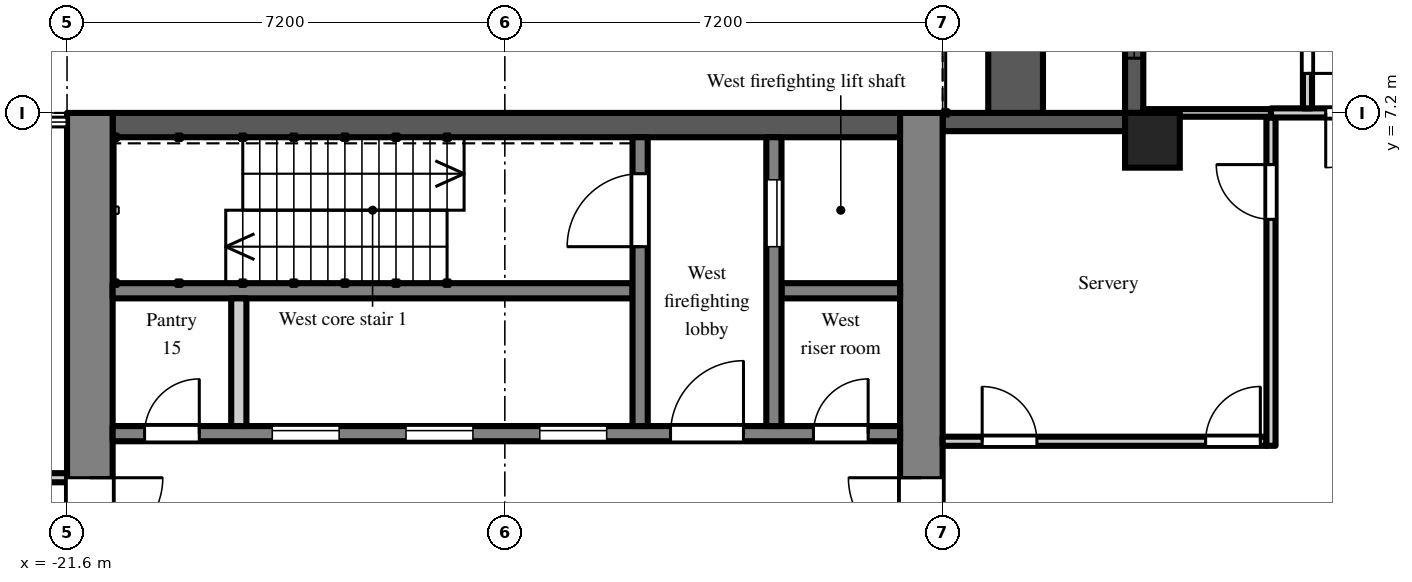
"""IFC4 building model, lengths in metres.
Left out: names, types, materials, properties, quantities, classifications, styles, units other than length and angle.
Written with IfcOpenShell. Run it as: python <this file> out.ifc"""

import sys

from ifc_helpers import new_model, si_unit, direction, frame, frame_2d, origin, origin_2d, place, context, subcontext, project, spatial, rectangle, extrude, element, fill, save


model = new_model("IFC4")
c1 = context("Model", 3, precision=1e-05, world=origin(), true_north=direction((0.0, 1.0)))
c2 = subcontext(c1, "Body", "Model", "MODEL_VIEW")
j1 = project(units=[si_unit("LENGTHUNIT", "METRE"), si_unit("PLANEANGLEUNIT", "RADIAN")], contexts=[c1])
p1 = place(None, origin())
s1 = spatial("IfcSite", under=j1, at=p1, CompositionType="ELEMENT")
p2 = place(p1, origin())
s2 = spatial("IfcBuilding", under=s1, at=p2, CompositionType="ELEMENT")
p3 = place(p2, frame((0.0, 0.0, 166.5)))
s3 = spatial("IfcBuildingStorey", under=s2, at=p3, CompositionType="ELEMENT", Elevation=166.5)
p4 = place(p3, frame((-3.75, 6.75, 0.0), z_axis=(0.0, 0.0, 1.0), x_axis=(1.0, 0.0, 0.0)))
e1 = element("IfcColumn", 1, at=p4, inside=s3, PredefinedType="COLUMN", context=c2, shape_type="SweptSolid", body=[
    extrude(rectangle(XDim=0.9, YDim=0.9, at=origin_2d()), origin(), (0.0, 0.0, 1.0), 4.2),
])
p5 = place(p3, frame((-4.05, 14.4, 0.0), z_axis=(0.0, 0.0, 1.0), x_axis=(0.0, -1.0, 0.0)))
e2 = element("IfcWall", 2, at=p5, inside=s3, PredefinedType="SOLIDWALL", context=c2, shape_type="SweptSolid", body=[
    extrude(rectangle(XDim=7.2, YDim=0.3, at=frame_2d((3.6, 0.0))), origin(), (0.0, 0.0, 1.0), 3.4),
])
p6 = place(p5, frame((3.0, 0.0, 0.0)))
e3 = element("IfcOpeningElement", 3, at=p6, cuts=e2, PredefinedType="OPENING", context=c2, shape_type="SweptSolid", body=[
    extrude(rectangle(XDim=1.2, YDim=2.05, at=frame_2d((0.6, 1.025))), frame((0.0, 0.16, 0.0), z_axis=(0.0, -1.0, 0.0), x_axis=(1.0, 0.0, 0.0)), (0.0, 0.0, 1.0), 0.32),
])
p7 = place(p5, frame((0.9, 0.0, 0.2)))
e4 = element("IfcOpeningElement", 4, at=p7, cuts=e2, PredefinedType="OPENING", context=c2, shape_type="SweptSolid", body=[
    extrude(rectangle(XDim=1.8, YDim=1.85, at=frame_2d((0.9, 0.925))), frame((0.0, 0.16, 0.0), z_axis=(0.0, -1.0, 0.0), x_axis=(1.0, 0.0, 0.0)), (0.0, 0.0, 1.0), 0.32),
])
p8 = place(p5, frame((4.5, 0.0, 0.2)))
e5 = element("IfcOpeningElement", 5, at=p8, cuts=e2, PredefinedType="OPENING", context=c2, shape_type="SweptSolid", body=[
    extrude(rectangle(XDim=1.8, YDim=1.85, at=frame_2d((0.9, 0.925))), frame((0.0, 0.16, 0.0), z_axis=(0.0, -1.0, 0.0), x_axis=(1.0, 0.0, 0.0)), (0.0, 0.0, 1.0), 0.32),
])
p9 = place(p3, frame((-4.2, 7.05, 0.0), z_axis=(0.0, 0.0, 1.0), x_axis=(-1.0, 0.0, 0.0)))
e6 = element("IfcWall", 6, at=p9, inside=s3, PredefinedType="SOLIDWALL", context=c2, shape_type="SweptSolid", body=[
    extrude(rectangle(XDim=3.0, YDim=0.3, at=frame_2d((1.5, 0.0))), origin(), (0.0, 0.0, 1.0), 3.4),
])
p10 = place(p3, frame((-6.0, 7.2, 0.0), z_axis=(0.0, 0.0, 1.0), x_axis=(0.0, 1.0, 0.0)))
e7 = element("IfcWall", 7, at=p10, inside=s3, PredefinedType="PARAPET", context=c2, shape_type="SweptSolid", body=[
    extrude(rectangle(XDim=7.2, YDim=0.9, at=frame_2d((3.6, 0.0))), origin(), (0.0, 0.0, 1.0), 0.8),
])
p11 = place(p3, frame((-7.55, -7.2, 0.0), z_axis=(0.0, 0.0, 1.0), x_axis=(0.0, 1.0, 0.0)))
e8 = element("IfcWall", 8, at=p11, inside=s3, PredefinedType="SHEAR", context=c2, shape_type="SweptSolid", body=[
    extrude(rectangle(XDim=14.4, YDim=0.7, at=frame_2d((7.2, 0.0))), origin(), (0.0, 0.0, 1.0), 3.8),
])
p12 = place(p11, frame((6.0, 0.0, 0.0)))
e9 = element("IfcOpeningElement", 9, at=p12, cuts=e8, PredefinedType="OPENING", context=c2, shape_type="SweptSolid", body=[
    extrude(rectangle(XDim=2.4, YDim=2.2, at=frame_2d((1.2, 1.1))), frame((0.0, 0.36, 0.0), z_axis=(0.0, -1.0, 0.0), x_axis=(1.0, 0.0, 0.0)), (0.0, 0.0, 1.0), 0.72),
])
p13 = place(p3, frame((-21.225, -7.2, 0.0), z_axis=(0.0, 0.0, 1.0), x_axis=(0.0, 1.0, 0.0)))
e10 = element("IfcWall", 10, at=p13, inside=s3, PredefinedType="SHEAR", context=c2, shape_type="SweptSolid", body=[
    extrude(rectangle(XDim=14.4, YDim=0.75, at=frame_2d((7.2, 0.0))), origin(), (0.0, 0.0, 1.0), 3.8),
])
p14 = place(p13, frame((6.0, 0.0, 0.0)))
e11 = element("IfcOpeningElement", 11, at=p14, cuts=e10, PredefinedType="OPENING", context=c2, shape_type="SweptSolid", body=[
    extrude(rectangle(XDim=2.4, YDim=2.2, at=frame_2d((1.2, 1.1))), frame((0.0, 0.385, 0.0), z_axis=(0.0, -1.0, 0.0), x_axis=(1.0, 0.0, 0.0)), (0.0, 0.0, 1.0), 0.77),
])
p15 = place(p3, frame((-7.9, 7.0, 0.0), z_axis=(0.0, 0.0, 1.0), x_axis=(-1.0, 0.0, 0.0)))
e12 = element("IfcWall", 12, at=p15, inside=s3, PredefinedType="SHEAR", context=c2, shape_type="SweptSolid", body=[
    extrude(rectangle(XDim=12.95, YDim=0.4, at=frame_2d((6.475, 0.0))), origin(), (0.0, 0.0, 1.0), 3.8),
])
p16 = place(p3, frame((-7.9, 1.925, 0.0), z_axis=(0.0, 0.0, 1.0), x_axis=(-1.0, 0.0, 0.0)))
e13 = element("IfcWall", 13, at=p16, inside=s3, PredefinedType="SHEAR", context=c2, shape_type="SweptSolid", body=[
    extrude(rectangle(XDim=12.95, YDim=0.25, at=frame_2d((6.475, 0.0))), origin(), (0.0, 0.0, 1.0), 3.8),
])
p17 = place(p16, frame((4.825, 0.0, 0.0)))
e14 = element("IfcOpeningElement", 14, at=p17, cuts=e13, PredefinedType="OPENING", context=c2, shape_type="SweptSolid", body=[
    extrude(rectangle(XDim=1.1, YDim=2.1, at=frame_2d((0.55, 1.05))), frame((0.0, 0.135, 0.0), z_axis=(0.0, -1.0, 0.0), x_axis=(1.0, 0.0, 0.0)), (0.0, 0.0, 1.0), 0.27),
])
p18 = place(p16, frame((7.025, 0.0, 0.0)))
e15 = element("IfcOpeningElement", 15, at=p18, cuts=e13, PredefinedType="OPENING", context=c2, shape_type="SweptSolid", body=[
    extrude(rectangle(XDim=1.1, YDim=2.1, at=frame_2d((0.55, 1.05))), frame((0.0, 0.135, 0.0), z_axis=(0.0, -1.0, 0.0), x_axis=(1.0, 0.0, 0.0)), (0.0, 0.0, 1.0), 0.27),
])
p19 = place(p16, frame((9.225, 0.0, 0.0)))
e16 = element("IfcOpeningElement", 16, at=p19, cuts=e13, PredefinedType="OPENING", context=c2, shape_type="SweptSolid", body=[
    extrude(rectangle(XDim=1.1, YDim=2.1, at=frame_2d((0.55, 1.05))), frame((0.0, 0.135, 0.0), z_axis=(0.0, -1.0, 0.0), x_axis=(1.0, 0.0, 0.0)), (0.0, 0.0, 1.0), 0.27),
])
p20 = place(p16, frame((0.525, 0.0, 0.0)))
e17 = element("IfcOpeningElement", 17, at=p20, cuts=e13, PredefinedType="OPENING", context=c2, shape_type="SweptSolid", body=[
    extrude(rectangle(XDim=0.9, YDim=2.1, at=frame_2d((0.45, 1.05))), frame((0.0, 0.135, 0.0), z_axis=(0.0, -1.0, 0.0), x_axis=(1.0, 0.0, 0.0)), (0.0, 0.0, 1.0), 0.27),
])
p21 = place(p16, frame((2.575, 0.0, 0.0)))
e18 = element("IfcOpeningElement", 18, at=p21, cuts=e13, PredefinedType="OPENING", context=c2, shape_type="SweptSolid", body=[
    extrude(rectangle(XDim=1.2, YDim=2.1, at=frame_2d((0.6, 1.05))), frame((0.0, 0.135, 0.0), z_axis=(0.0, -1.0, 0.0), x_axis=(1.0, 0.0, 0.0)), (0.0, 0.0, 1.0), 0.27),
])
p22 = place(p16, frame((11.525, 0.0, 0.0)))
e19 = element("IfcOpeningElement", 19, at=p22, cuts=e13, PredefinedType="OPENING", context=c2, shape_type="SweptSolid", body=[
    extrude(rectangle(XDim=0.9, YDim=2.1, at=frame_2d((0.45, 1.05))), frame((0.0, 0.135, 0.0), z_axis=(0.0, -1.0, 0.0), x_axis=(1.0, 0.0, 0.0)), (0.0, 0.0, 1.0), 0.27),
])
p23 = place(p3, frame((-7.9, 4.275, 0.0), z_axis=(0.0, 0.0, 1.0), x_axis=(-1.0, 0.0, 0.0)))
e20 = element("IfcWall", 20, at=p23, inside=s3, PredefinedType="SHEAR", context=c2, shape_type="SweptSolid", body=[
    extrude(rectangle(XDim=1.95, YDim=0.25, at=frame_2d((0.975, 0.0))), origin(), (0.0, 0.0, 1.0), 3.8),
])
p24 = place(p3, frame((-12.3, 4.275, 0.0), z_axis=(0.0, 0.0, 1.0), x_axis=(-1.0, 0.0, 0.0)))
e21 = element("IfcWall", 21, at=p24, inside=s3, PredefinedType="SHEAR", context=c2, shape_type="SweptSolid", body=[
    extrude(rectangle(XDim=8.55, YDim=0.25, at=frame_2d((4.275, 0.0))), origin(), (0.0, 0.0, 1.0), 3.8),
])
p25 = place(p3, frame((-9.975, 2.05, 0.0), z_axis=(0.0, 0.0, 1.0), x_axis=(0.0, 1.0, 0.0)))
e22 = element("IfcWall", 22, at=p25, inside=s3, PredefinedType="SHEAR", context=c2, shape_type="SweptSolid", body=[
    extrude(rectangle(XDim=4.75, YDim=0.25, at=frame_2d((2.375, 0.0))), origin(), (0.0, 0.0, 1.0), 3.8),
])
p26 = place(p25, frame((2.95, 0.0, 0.0)))
e23 = element("IfcOpeningElement", 23, at=p26, cuts=e22, PredefinedType="OPENING", context=c2, shape_type="SweptSolid", body=[
    extrude(rectangle(XDim=1.1, YDim=2.1, at=frame_2d((0.55, 1.05))), frame((0.0, 0.135, 0.0), z_axis=(0.0, -1.0, 0.0), x_axis=(1.0, 0.0, 0.0)), (0.0, 0.0, 1.0), 0.27),
])
p27 = place(p3, frame((-12.175, 2.05, 0.0), z_axis=(0.0, 0.0, 1.0), x_axis=(0.0, 1.0, 0.0)))
e24 = element("IfcWall", 24, at=p27, inside=s3, PredefinedType="SHEAR", context=c2, shape_type="SweptSolid", body=[
    extrude(rectangle(XDim=4.75, YDim=0.25, at=frame_2d((2.375, 0.0))), origin(), (0.0, 0.0, 1.0), 3.8),
])
p28 = place(p27, frame((2.95, 0.0, 0.0)))
e25 = element("IfcOpeningElement", 25, at=p28, cuts=e24, PredefinedType="OPENING", context=c2, shape_type="SweptSolid", body=[
    extrude(rectangle(XDim=1.2, YDim=2.1, at=frame_2d((0.6, 1.05))), frame((0.0, 0.135, 0.0), z_axis=(0.0, -1.0, 0.0), x_axis=(1.0, 0.0, 0.0)), (0.0, 0.0, 1.0), 0.27),
])
p29 = place(p3, frame((-18.775, 2.05, 0.0), z_axis=(0.0, 0.0, 1.0), x_axis=(0.0, 1.0, 0.0)))
e26 = element("IfcWall", 26, at=p29, inside=s3, PredefinedType="PARTITIONING", context=c2, shape_type="SweptSolid", body=[
    extrude(rectangle(XDim=2.1, YDim=0.25, at=frame_2d((1.05, 0.0))), origin(), (0.0, 0.0, 1.0), 3.8),
])
p30 = place(p3, frame((-36.5, 1.2, 0.0), z_axis=(0.0, 0.0, 1.0), x_axis=(1.0, 0.0, 0.0)))
e27 = element("IfcWall", 27, at=p30, inside=s3, PredefinedType="PARTITIONING", context=c2, shape_type="SweptSolid", body=[
    extrude(rectangle(XDim=14.9, YDim=0.15, at=frame_2d((7.45, 0.0))), origin(), (0.0, 0.0, 1.0), 3.8),
])
p31 = place(p30, frame((3.55, 0.0, 0.0)))
e28 = element("IfcOpeningElement", 28, at=p31, cuts=e27, PredefinedType="OPENING", context=c2, shape_type="SweptSolid", body=[
    extrude(rectangle(XDim=1.8, YDim=2.1, at=frame_2d((0.9, 1.05))), frame((0.0, 0.085, 0.0), z_axis=(0.0, -1.0, 0.0), x_axis=(1.0, 0.0, 0.0)), (0.0, 0.0, 1.0), 0.17),
])
p32 = place(p30, frame((8.4, 0.0, 0.0)))
e29 = element("IfcOpeningElement", 29, at=p32, cuts=e27, PredefinedType="OPENING", context=c2, shape_type="SweptSolid", body=[
    extrude(rectangle(XDim=1.0, YDim=2.1, at=frame_2d((0.5, 1.05))), frame((0.0, 0.085, 0.0), z_axis=(0.0, -1.0, 0.0), x_axis=(1.0, 0.0, 0.0)), (0.0, 0.0, 1.0), 0.17),
])
p33 = place(p30, frame((12.25, 0.0, 0.0)))
e30 = element("IfcOpeningElement", 30, at=p33, cuts=e27, PredefinedType="OPENING", context=c2, shape_type="SweptSolid", body=[
    extrude(rectangle(XDim=1.8, YDim=2.1, at=frame_2d((0.9, 1.05))), frame((0.0, 0.085, 0.0), z_axis=(0.0, -1.0, 0.0), x_axis=(1.0, 0.0, 0.0)), (0.0, 0.0, 1.0), 0.17),
])
p34 = place(p30, frame((0.55, 0.0, 0.0)))
e31 = element("IfcOpeningElement", 31, at=p34, cuts=e27, PredefinedType="OPENING", context=c2, shape_type="SweptSolid", body=[
    extrude(rectangle(XDim=1.8, YDim=2.1, at=frame_2d((0.9, 1.05))), frame((0.0, 0.085, 0.0), z_axis=(0.0, -1.0, 0.0), x_axis=(1.0, 0.0, 0.0)), (0.0, 0.0, 1.0), 0.17),
])
p35 = place(p3, frame((-7.2, 1.8, 0.0), z_axis=(0.0, 0.0, 1.0), x_axis=(1.0, 0.0, 0.0)))
e32 = element("IfcWall", 32, at=p35, inside=s3, PredefinedType="PARTITIONING", context=c2, shape_type="SweptSolid", body=[
    extrude(rectangle(XDim=5.325, YDim=0.15, at=frame_2d((2.663, 0.0))), origin(), (0.0, 0.0, 1.0), 3.8),
])
p36 = place(p35, frame((0.65, 0.0, 0.0)))
e33 = element("IfcOpeningElement", 33, at=p36, cuts=e32, PredefinedType="OPENING", context=c2, shape_type="SweptSolid", body=[
    extrude(rectangle(XDim=0.9, YDim=2.1, at=frame_2d((0.45, 1.05))), frame((0.0, 0.085, 0.0), z_axis=(0.0, -1.0, 0.0), x_axis=(1.0, 0.0, 0.0)), (0.0, 0.0, 1.0), 0.17),
])
p37 = place(p35, frame((4.325, 0.0, 0.0)))
e34 = element("IfcOpeningElement", 34, at=p37, cuts=e32, PredefinedType="OPENING", context=c2, shape_type="SweptSolid", body=[
    extrude(rectangle(XDim=0.9, YDim=2.1, at=frame_2d((0.45, 1.05))), frame((0.0, 0.085, 0.0), z_axis=(0.0, -1.0, 0.0), x_axis=(1.0, 0.0, 0.0)), (0.0, 0.0, 1.0), 0.17),
])
p38 = place(p3, frame((-3.9, 7.2, 0.0), z_axis=(0.0, 0.0, 1.0), x_axis=(1.0, 0.0, 0.0)))
e35 = element("IfcWall", 35, at=p38, inside=s3, PredefinedType="PARTITIONING", context=c2, shape_type="SweptSolid", body=[
    extrude(rectangle(XDim=2.1, YDim=0.125, at=frame_2d((1.05, 0.0))), origin(), (0.0, 0.0, 1.0), 3.8),
])
p39 = place(p3, frame((-1.8, 1.725, 0.0), z_axis=(0.0, 0.0, 1.0), x_axis=(0.0, 1.0, 0.0)))
e36 = element("IfcWall", 36, at=p39, inside=s3, PredefinedType="PARTITIONING", context=c2, shape_type="SweptSolid", body=[
    extrude(rectangle(XDim=5.4, YDim=0.15, at=frame_2d((2.7, 0.0))), origin(), (0.0, 0.0, 1.0), 3.8),
])
p40 = place(p39, frame((3.725, 0.0, 0.0)))
e37 = element("IfcOpeningElement", 37, at=p40, cuts=e36, PredefinedType="OPENING", context=c2, shape_type="SweptSolid", body=[
    extrude(rectangle(XDim=0.9, YDim=2.1, at=frame_2d((0.45, 1.05))), frame((0.0, 0.085, 0.0), z_axis=(0.0, -1.0, 0.0), x_axis=(1.0, 0.0, 0.0)), (0.0, 0.0, 1.0), 0.17),
])
p41 = place(p3, frame((-1.8, 7.2, 0.0), z_axis=(0.0, 0.0, 1.0), x_axis=(1.0, 0.0, 0.0)))
e38 = element("IfcWall", 38, at=p41, inside=s3, PredefinedType="PARTITIONING", context=c2, shape_type="SweptSolid", body=[
    extrude(rectangle(XDim=3.6, YDim=0.15, at=frame_2d((1.8, 0.0))), origin(), (0.0, 0.0, 1.0), 3.8),
])
p42 = place(p41, frame((0.9, 0.0, 0.0)))
e39 = element("IfcOpeningElement", 39, at=p42, cuts=e38, PredefinedType="OPENING", context=c2, shape_type="SweptSolid", body=[
    extrude(rectangle(XDim=1.8, YDim=2.1, at=frame_2d((0.9, 1.05))), frame((0.0, 0.085, 0.0), z_axis=(0.0, -1.0, 0.0), x_axis=(1.0, 0.0, 0.0)), (0.0, 0.0, 1.0), 0.17),
])
p43 = place(p3, frame((-1.2, 7.275, 0.0), z_axis=(0.0, 0.0, 1.0), x_axis=(0.0, 1.0, 0.0)))
e40 = element("IfcWall", 40, at=p43, inside=s3, PredefinedType="PARTITIONING", context=c2, shape_type="SweptSolid", body=[
    extrude(rectangle(XDim=14.145, YDim=0.15, at=frame_2d((7.073, 0.0))), origin(), (0.0, 0.0, 1.0), 3.8),
])
p44 = place(p43, frame((0.575, 0.0, 0.0)))
e41 = element("IfcOpeningElement", 41, at=p44, cuts=e40, PredefinedType="OPENING", context=c2, shape_type="SweptSolid", body=[
    extrude(rectangle(XDim=1.8, YDim=2.1, at=frame_2d((0.9, 1.05))), frame((0.0, 0.085, 0.0), z_axis=(0.0, -1.0, 0.0), x_axis=(1.0, 0.0, 0.0)), (0.0, 0.0, 1.0), 0.17),
])
p45 = place(p43, frame((4.225, 0.0, 0.0)))
e42 = element("IfcOpeningElement", 42, at=p45, cuts=e40, PredefinedType="OPENING", context=c2, shape_type="SweptSolid", body=[
    extrude(rectangle(XDim=1.0, YDim=2.1, at=frame_2d((0.5, 1.05))), frame((0.0, 0.085, 0.0), z_axis=(0.0, -1.0, 0.0), x_axis=(1.0, 0.0, 0.0)), (0.0, 0.0, 1.0), 0.17),
])
p46 = place(p43, frame((6.875, 0.0, 0.0)))
e43 = element("IfcOpeningElement", 43, at=p46, cuts=e40, PredefinedType="OPENING", context=c2, shape_type="SweptSolid", body=[
    extrude(rectangle(XDim=1.8, YDim=2.1, at=frame_2d((0.9, 1.05))), frame((0.0, 0.085, 0.0), z_axis=(0.0, -1.0, 0.0), x_axis=(1.0, 0.0, 0.0)), (0.0, 0.0, 1.0), 0.17),
])
p47 = place(p43, frame((11.275, 0.0, 0.0)))
e44 = element("IfcOpeningElement", 44, at=p47, cuts=e40, PredefinedType="OPENING", context=c2, shape_type="SweptSolid", body=[
    extrude(rectangle(XDim=1.0, YDim=2.1, at=frame_2d((0.5, 1.05))), frame((0.0, 0.085, 0.0), z_axis=(0.0, -1.0, 0.0), x_axis=(1.0, 0.0, 0.0)), (0.0, 0.0, 1.0), 0.17),
])
p48 = place(p8, origin())
e45 = element("IfcWindow", 45, at=p48, inside=s3, PartitioningType="SINGLE_PANEL", PredefinedType="WINDOW", context=c2, shape_type="SweptSolid", body=[
    extrude(rectangle(XDim=1.8, YDim=1.85, at=frame_2d((0.9, 0.925))), frame((0.0, 0.03, 0.0), z_axis=(0.0, -1.0, 0.0), x_axis=(1.0, 0.0, 0.0)), (0.0, 0.0, 1.0), 0.06),
])
fill(e5, e45)
p49 = place(p17, origin())
e46 = element("IfcDoor", 46, at=p49, inside=s3, OperationType="SLIDING_TO_LEFT", PredefinedType="DOOR", context=c2, shape_type="SweptSolid", body=[
    extrude(rectangle(XDim=1.1, YDim=2.1, at=frame_2d((0.55, 1.05))), frame((0.0, 0.025, 0.0), z_axis=(0.0, -1.0, 0.0), x_axis=(1.0, 0.0, 0.0)), (0.0, 0.0, 1.0), 0.05),
])
fill(e14, e46)
p50 = place(p18, origin())
e47 = element("IfcDoor", 47, at=p50, inside=s3, OperationType="SLIDING_TO_LEFT", PredefinedType="DOOR", context=c2, shape_type="SweptSolid", body=[
    extrude(rectangle(XDim=1.1, YDim=2.1, at=frame_2d((0.55, 1.05))), frame((0.0, 0.025, 0.0), z_axis=(0.0, -1.0, 0.0), x_axis=(1.0, 0.0, 0.0)), (0.0, 0.0, 1.0), 0.05),
])
fill(e15, e47)
p51 = place(p19, origin())
e48 = element("IfcDoor", 48, at=p51, inside=s3, OperationType="SLIDING_TO_LEFT", PredefinedType="DOOR", context=c2, shape_type="SweptSolid", body=[
    extrude(rectangle(XDim=1.1, YDim=2.1, at=frame_2d((0.55, 1.05))), frame((0.0, 0.025, 0.0), z_axis=(0.0, -1.0, 0.0), x_axis=(1.0, 0.0, 0.0)), (0.0, 0.0, 1.0), 0.05),
])
fill(e16, e48)
p52 = place(p26, origin())
e49 = element("IfcDoor", 49, at=p52, inside=s3, OperationType="SLIDING_TO_LEFT", PredefinedType="DOOR", context=c2, shape_type="SweptSolid", body=[
    extrude(rectangle(XDim=1.1, YDim=2.1, at=frame_2d((0.55, 1.05))), frame((0.0, 0.025, 0.0), z_axis=(0.0, -1.0, 0.0), x_axis=(1.0, 0.0, 0.0)), (0.0, 0.0, 1.0), 0.05),
])
fill(e23, e49)
p53 = place(p28, origin())
e50 = element("IfcDoor", 50, at=p53, inside=s3, OperationType="SINGLE_SWING_LEFT", PredefinedType="DOOR", context=c2, shape_type="SweptSolid", body=[
    extrude(rectangle(XDim=1.2, YDim=2.1, at=frame_2d((0.6, 1.05))), frame((0.0, 0.025, 0.0), z_axis=(0.0, -1.0, 0.0), x_axis=(1.0, 0.0, 0.0)), (0.0, 0.0, 1.0), 0.05),
])
fill(e25, e50)
p54 = place(p20, frame((0.9, 0.0, 0.0), z_axis=(0.0, 0.0, 1.0), x_axis=(-1.0, 0.0, 0.0)))
e51 = element("IfcDoor", 51, at=p54, inside=s3, OperationType="SINGLE_SWING_RIGHT", PredefinedType="DOOR", context=c2, shape_type="SweptSolid", body=[
    extrude(rectangle(XDim=0.9, YDim=2.1, at=frame_2d((0.45, 1.05))), frame((0.0, 0.025, 0.0), z_axis=(0.0, -1.0, 0.0), x_axis=(1.0, 0.0, 0.0)), (0.0, 0.0, 1.0), 0.05),
])
fill(e17, e51)
p55 = place(p21, frame((1.2, 0.0, 0.0), z_axis=(0.0, 0.0, 1.0), x_axis=(-1.0, 0.0, 0.0)))
e52 = element("IfcDoor", 52, at=p55, inside=s3, OperationType="SINGLE_SWING_RIGHT", PredefinedType="DOOR", context=c2, shape_type="SweptSolid", body=[
    extrude(rectangle(XDim=1.2, YDim=2.1, at=frame_2d((0.6, 1.05))), frame((0.0, 0.025, 0.0), z_axis=(0.0, -1.0, 0.0), x_axis=(1.0, 0.0, 0.0)), (0.0, 0.0, 1.0), 0.05),
])
fill(e18, e52)
p56 = place(p12, origin())
e53 = element("IfcDoor", 53, at=p56, inside=s3, OperationType="DOUBLE_DOOR_DOUBLE_SWING", PredefinedType="DOOR", context=c2, shape_type="SweptSolid", body=[
    extrude(rectangle(XDim=2.4, YDim=2.2, at=frame_2d((1.2, 1.1))), frame((0.0, 0.025, 0.0), z_axis=(0.0, -1.0, 0.0), x_axis=(1.0, 0.0, 0.0)), (0.0, 0.0, 1.0), 0.05),
])
fill(e9, e53)
p57 = place(p14, frame((2.4, 0.0, 0.0), z_axis=(0.0, 0.0, 1.0), x_axis=(-1.0, 0.0, 0.0)))
e54 = element("IfcDoor", 54, at=p57, inside=s3, OperationType="DOUBLE_DOOR_DOUBLE_SWING", PredefinedType="DOOR", context=c2, shape_type="SweptSolid", body=[
    extrude(rectangle(XDim=2.4, YDim=2.2, at=frame_2d((1.2, 1.1))), frame((0.0, 0.025, 0.0), z_axis=(0.0, -1.0, 0.0), x_axis=(1.0, 0.0, 0.0)), (0.0, 0.0, 1.0), 0.05),
])
fill(e11, e54)
p58 = place(p22, frame((0.9, 0.0, 0.0), z_axis=(0.0, 0.0, 1.0), x_axis=(-1.0, 0.0, 0.0)))
e55 = element("IfcDoor", 55, at=p58, inside=s3, OperationType="SINGLE_SWING_RIGHT", PredefinedType="DOOR", context=c2, shape_type="SweptSolid", body=[
    extrude(rectangle(XDim=0.9, YDim=2.1, at=frame_2d((0.45, 1.05))), frame((0.0, 0.025, 0.0), z_axis=(0.0, -1.0, 0.0), x_axis=(1.0, 0.0, 0.0)), (0.0, 0.0, 1.0), 0.05),
])
fill(e19, e55)
p59 = place(p36, origin())
e56 = element("IfcDoor", 56, at=p59, inside=s3, OperationType="SINGLE_SWING_LEFT", PredefinedType="DOOR", context=c2, shape_type="SweptSolid", body=[
    extrude(rectangle(XDim=0.9, YDim=2.1, at=frame_2d((0.45, 1.05))), frame((0.0, 0.025, 0.0), z_axis=(0.0, -1.0, 0.0), x_axis=(1.0, 0.0, 0.0)), (0.0, 0.0, 1.0), 0.05),
])
fill(e33, e56)
p60 = place(p37, origin())
e57 = element("IfcDoor", 57, at=p60, inside=s3, OperationType="SINGLE_SWING_RIGHT", PredefinedType="DOOR", context=c2, shape_type="SweptSolid", body=[
    extrude(rectangle(XDim=0.9, YDim=2.1, at=frame_2d((0.45, 1.05))), frame((0.0, 0.025, 0.0), z_axis=(0.0, -1.0, 0.0), x_axis=(1.0, 0.0, 0.0)), (0.0, 0.0, 1.0), 0.05),
])
fill(e34, e57)
p61 = place(p40, origin())
e58 = element("IfcDoor", 58, at=p61, inside=s3, OperationType="SINGLE_SWING_RIGHT", PredefinedType="DOOR", context=c2, shape_type="SweptSolid", body=[
    extrude(rectangle(XDim=0.9, YDim=2.1, at=frame_2d((0.45, 1.05))), frame((0.0, 0.025, 0.0), z_axis=(0.0, -1.0, 0.0), x_axis=(1.0, 0.0, 0.0)), (0.0, 0.0, 1.0), 0.05),
])
fill(e37, e58)
p62 = place(p42, frame((1.8, 0.0, 0.0), z_axis=(0.0, 0.0, 1.0), x_axis=(-1.0, 0.0, 0.0)))
e59 = element("IfcDoor", 59, at=p62, inside=s3, OperationType="DOUBLE_DOOR_DOUBLE_SWING", PredefinedType="DOOR", context=c2, shape_type="SweptSolid", body=[
    extrude(rectangle(XDim=1.8, YDim=2.1, at=frame_2d((0.9, 1.05))), frame((0.0, 0.025, 0.0), z_axis=(0.0, -1.0, 0.0), x_axis=(1.0, 0.0, 0.0)), (0.0, 0.0, 1.0), 0.05),
])
fill(e39, e59)
p63 = place(p44, frame((1.8, 0.0, 0.0), z_axis=(0.0, 0.0, 1.0), x_axis=(-1.0, 0.0, 0.0)))
e60 = element("IfcDoor", 60, at=p63, inside=s3, OperationType="DOUBLE_DOOR_DOUBLE_SWING", PredefinedType="DOOR", context=c2, shape_type="SweptSolid", body=[
    extrude(rectangle(XDim=1.8, YDim=2.1, at=frame_2d((0.9, 1.05))), frame((0.0, 0.025, 0.0), z_axis=(0.0, -1.0, 0.0), x_axis=(1.0, 0.0, 0.0)), (0.0, 0.0, 1.0), 0.05),
])
fill(e41, e60)
save(model, sys.argv[1])
